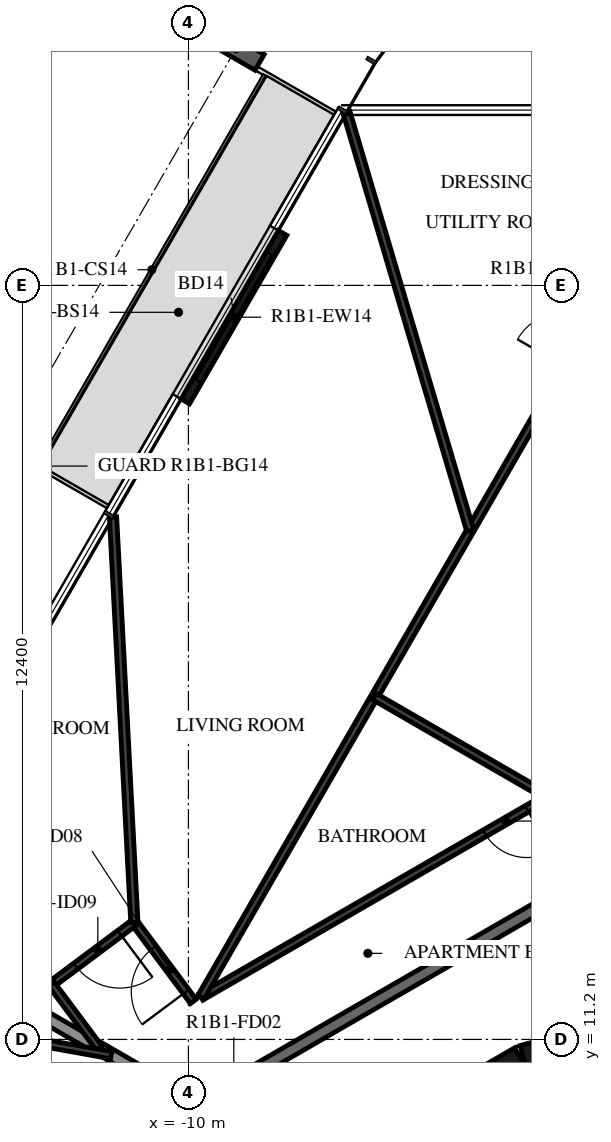
"""IFC4 building model, lengths in metres.
Left out: names, types, materials, properties, quantities, classifications, styles, units other than length and angle.
Written with IfcOpenShell. Run it as: python <this file> out.ifc"""

import sys

from ifc_helpers import new_model, si_unit, direction, frame, frame_2d, origin, origin_2d, place, context, subcontext, project, spatial, rectangle, i_section, extrude, element, fill, save


model = new_model("IFC4")
c1 = context("Model", 3, precision=1e-05, world=origin(), true_north=direction((0.0, 1.0)))
c2 = subcontext(c1, "Body", "Model", "MODEL_VIEW")
j1 = project(units=[si_unit("LENGTHUNIT", "METRE"), si_unit("PLANEANGLEUNIT", "RADIAN")], contexts=[c1])
p1 = place(None, origin())
s1 = spatial("IfcSite", under=j1, at=p1, CompositionType="ELEMENT")
p2 = place(p1, origin())
s2 = spatial("IfcBuilding", under=s1, at=p2, CompositionType="ELEMENT")
p3 = place(p2, frame((0.0, 0.0, 48.9)))
s3 = spatial("IfcBuildingStorey", under=s2, at=p3, CompositionType="ELEMENT", Elevation=48.9)
p4 = place(p3, frame((-9.219, 27.493, -0.38), z_axis=(0.0, 0.0, 1.0), x_axis=(0.50000017485, 0.866025302835, 0.0)))
e1 = element("IfcColumn", 1, at=p4, inside=s3, PredefinedType="COLUMN", context=c2, shape_type="SweptSolid", body=[
    extrude(i_section(OverallWidth=0.3, OverallDepth=0.9, WebThickness=0.019, FlangeThickness=0.035, FilletRadius=0.03, at=origin_2d()), origin(), (0.0, 0.0, 1.0), 3.5),
])
p5 = place(p3, frame((-8.451, 24.463, 0.0), z_axis=(0.0, 0.0, 1.0), x_axis=(-0.499971222258, -0.866042017984, 0.0)))
e2 = element("IfcWall", 2, at=p5, inside=s3, PredefinedType="STANDARD", context=c2, shape_type="SweptSolid", body=[
    extrude(rectangle(XDim=3.2, YDim=0.16, at=frame_2d((1.6, 0.0))), origin(), (0.0, 0.0, 1.0), 3.12),
])
p6 = place(p5, frame((0.4, 0.0, 0.0)))
e3 = element("IfcOpeningElement", 3, at=p6, cuts=e2, PredefinedType="OPENING", context=c2, shape_type="SweptSolid", body=[
    extrude(rectangle(XDim=2.4, YDim=2.4, at=frame_2d((1.2, 1.2))), frame((0.0, 0.09, 0.0), z_axis=(0.0, -1.0, 0.0), x_axis=(1.0, 0.0, 0.0)), (0.0, 0.0, 1.0), 0.18),
])
for number, where, z_axis, x_axis in (
    (4, (-1.55, 11.643, 0.0), (0.0, 0.0, 1.0), (-0.966, -0.259, 0.0)),
    (5, (-4.51, 10.845, 0.0), (0.0, 0.0, 1.0), (-0.866, -0.5, 0.0)),
):
    element("IfcWall", number, at=place(p3, frame(where, z_axis=z_axis, x_axis=x_axis)), inside=s3, PredefinedType="SHEAR", context=c2, shape_type="SweptSolid", body=[
        extrude(rectangle(XDim=3.033, YDim=0.5, at=frame_2d((1.516, 0.0))), origin(), (0.0, 0.0, 1.0), 3.12),
    ])
p7 = place(p3, frame((-3.671, 13.7, 0.0), z_axis=(0.0, 0.0, 1.0), x_axis=(-0.866031419417, -0.499989580474, 0.0)))
e6 = element("IfcWall", 6, at=p7, inside=s3, PredefinedType="STANDARD", context=c2, shape_type="SweptSolid", body=[
    extrude(rectangle(XDim=7.147, YDim=0.2, at=frame_2d((3.573, 0.0))), origin(), (0.0, 0.0, 1.0), 3.12),
])
p8 = place(p7, frame((5.947, 0.0, 0.0)))
e7 = element("IfcOpeningElement", 7, at=p8, cuts=e6, PredefinedType="OPENING", context=c2, shape_type="SweptSolid", body=[
    extrude(rectangle(XDim=1.0, YDim=2.1, at=frame_2d((0.5, 1.05))), frame((0.0, 0.11, 0.0), z_axis=(0.0, -1.0, 0.0), x_axis=(1.0, 0.0, 0.0)), (0.0, 0.0, 1.0), 0.22),
])
p9 = place(p3, frame((-15.08, 13.14, 0.0), z_axis=(0.0, 0.0, 1.0), x_axis=(0.86603112331, -0.49999009336, 0.0)))
e8 = element("IfcWall", 8, at=p9, inside=s3, PredefinedType="STANDARD", context=c2, shape_type="SweptSolid", body=[
    extrude(rectangle(XDim=6.027, YDim=0.2, at=frame_2d((3.014, 0.0))), origin(), (0.0, 0.0, 1.0), 2.73),
])
p10 = place(p3, frame((-9.92, 11.824, 0.0), z_axis=(0.0, 0.0, 1.0), x_axis=(-0.597853402964, 0.801605456921, 0.0)))
e9 = element("IfcWall", 9, at=p10, inside=s3, PredefinedType="PARTITIONING", context=c2, shape_type="SweptSolid", body=[
    extrude(rectangle(XDim=1.621, YDim=0.12, at=frame_2d((0.811, 0.0))), origin(), (0.0, 0.0, 1.0), 3.12),
])
p11 = place(p10, frame((0.2, 0.0, 0.0)))
e10 = element("IfcOpeningElement", 10, at=p11, cuts=e9, PredefinedType="OPENING", context=c2, shape_type="SweptSolid", body=[
    extrude(rectangle(XDim=0.9, YDim=2.1, at=frame_2d((0.45, 1.05))), frame((0.0, 0.07, 0.0), z_axis=(0.0, -1.0, 0.0), x_axis=(1.0, 0.0, 0.0)), (0.0, 0.0, 1.0), 0.14),
])
p12 = place(p3, frame((-4.088, 15.191, 0.0), z_axis=(0.0, 0.0, 1.0), x_axis=(-0.866024500911, -0.50000156382, 0.0)))
e11 = element("IfcWall", 11, at=p12, inside=s3, PredefinedType="PARTITIONING", context=c2, shape_type="SweptSolid", body=[
    extrude(rectangle(XDim=6.587, YDim=0.12, at=frame_2d((3.294, 0.0))), origin(), (0.0, 0.0, 1.0), 3.12),
])
p13 = place(p12, frame((0.4, 0.0, 0.0)))
e12 = element("IfcOpeningElement", 12, at=p13, cuts=e11, PredefinedType="OPENING", context=c2, shape_type="SweptSolid", body=[
    extrude(rectangle(XDim=0.8, YDim=2.1, at=frame_2d((0.4, 1.05))), frame((0.0, 0.07, 0.0), z_axis=(0.0, -1.0, 0.0), x_axis=(1.0, 0.0, 0.0)), (0.0, 0.0, 1.0), 0.14),
])
p14 = place(p3, frame((-10.889, 13.124, 0.0), z_axis=(0.0, 0.0, 1.0), x_axis=(-0.801616976804, -0.597837956724, 0.0)))
e13 = element("IfcWall", 13, at=p14, inside=s3, PredefinedType="PARTITIONING", context=c2, shape_type="SweptSolid", body=[
    extrude(rectangle(XDim=1.7, YDim=0.12, at=frame_2d((0.85, 0.0))), origin(), (0.0, 0.0, 1.0), 3.12),
])
p15 = place(p14, frame((0.3, 0.0, 0.0)))
e14 = element("IfcOpeningElement", 14, at=p15, cuts=e13, PredefinedType="OPENING", context=c2, shape_type="SweptSolid", body=[
    extrude(rectangle(XDim=0.9, YDim=2.1, at=frame_2d((0.45, 1.05))), frame((0.0, 0.07, 0.0), z_axis=(0.0, -1.0, 0.0), x_axis=(1.0, 0.0, 0.0)), (0.0, 0.0, 1.0), 0.14),
])
p16 = place(p3, frame((-12.252, 12.107, 0.0), z_axis=(0.0, 0.0, 1.0), x_axis=(0.597827926538, -0.801624457119, 0.0)))
e15 = element("IfcWall", 15, at=p16, inside=s3, PredefinedType="PARTITIONING", context=c2, shape_type="SweptSolid", body=[
    extrude(rectangle(XDim=1.314, YDim=0.12, at=frame_2d((0.657, 0.0))), origin(), (0.0, 0.0, 1.0), 3.12),
])
p17 = place(p3, frame((-9.793, 11.897, 0.0), z_axis=(0.0, 0.0, 1.0), x_axis=(0.499981117606, 0.866036305265, 0.0)))
e16 = element("IfcWall", 16, at=p17, inside=s3, PredefinedType="PARTITIONING", context=c2, shape_type="SweptSolid", body=[
    extrude(rectangle(XDim=14.434, YDim=0.12, at=frame_2d((7.217, 0.0))), origin(), (0.0, 0.0, 1.0), 3.12),
])
p18 = place(p17, frame((11.97, 0.0, 0.0)))
e17 = element("IfcOpeningElement", 17, at=p18, cuts=e16, PredefinedType="OPENING", context=c2, shape_type="SweptSolid", body=[
    extrude(rectangle(XDim=0.9, YDim=2.1, at=frame_2d((0.45, 1.05))), frame((0.0, 0.07, 0.0), z_axis=(0.0, -1.0, 0.0), x_axis=(1.0, 0.0, 0.0)), (0.0, 0.0, 1.0), 0.14),
])
p19 = place(p3, frame((-6.941, 16.838, 0.0), z_axis=(0.0, 0.0, 1.0), x_axis=(0.866017718408, -0.500013311227, 0.0)))
e18 = element("IfcWall", 18, at=p19, inside=s3, PredefinedType="PARTITIONING", context=c2, shape_type="SweptSolid", body=[
    extrude(rectangle(XDim=3.294, YDim=0.12, at=frame_2d((1.647, 0.0))), origin(), (0.0, 0.0, 1.0), 3.12),
])
p20 = place(p3, frame((-7.4, 26.443, 0.0), z_axis=(0.0, 0.0, 1.0), x_axis=(0.283756762476, -0.958896292489, 0.0)))
e19 = element("IfcWall", 19, at=p20, inside=s3, PredefinedType="PARTITIONING", context=c2, shape_type="SweptSolid", body=[
    extrude(rectangle(XDim=7.17, YDim=0.12, at=frame_2d((3.585, 0.0))), origin(), (0.0, 0.0, 1.0), 3.12),
])
p21 = place(p3, frame((-11.24, 19.792, 0.0), z_axis=(0.0, 0.0, 1.0), x_axis=(0.052579943632, -0.998616718029, 0.0)))
e20 = element("IfcWall", 20, at=p21, inside=s3, PredefinedType="PARTITIONING", context=c2, shape_type="SweptSolid", body=[
    extrude(rectangle(XDim=6.677, YDim=0.12, at=frame_2d((3.338, 0.0))), origin(), (0.0, 0.0, 1.0), 3.12),
])
p22 = place(p3, frame((-11.27, 10.94, 0.0), z_axis=(0.0, 0.0, 1.0), x_axis=(-0.984382718707, 0.176041651637, 0.0)))
e21 = element("IfcWall", 21, at=p22, inside=s3, PredefinedType="PARTITIONING", context=c2, shape_type="SweptSolid", body=[
    extrude(rectangle(XDim=2.222, YDim=0.12, at=frame_2d((1.111, 0.0))), origin(), (0.0, 0.0, 1.0), 3.12),
])
p23 = place(p6, origin())
e22 = element("IfcDoor", 22, at=p23, inside=s3, OperationType="DOUBLE_DOOR_SLIDING", PredefinedType="DOOR", context=c2, shape_type="SweptSolid", body=[
    extrude(rectangle(XDim=2.4, YDim=2.4, at=frame_2d((1.2, 1.2))), frame((0.0, 0.025, 0.0), z_axis=(0.0, -1.0, 0.0), x_axis=(1.0, 0.0, 0.0)), (0.0, 0.0, 1.0), 0.05),
])
fill(e3, e22)
p24 = place(p11, origin())
e23 = element("IfcDoor", 23, at=p24, inside=s3, OperationType="SINGLE_SWING_RIGHT", PredefinedType="DOOR", context=c2, shape_type="SweptSolid", body=[
    extrude(rectangle(XDim=0.9, YDim=2.1, at=frame_2d((0.45, 1.05))), frame((0.0, 0.025, 0.0), z_axis=(0.0, -1.0, 0.0), x_axis=(1.0, 0.0, 0.0)), (0.0, 0.0, 1.0), 0.05),
])
fill(e10, e23)
p25 = place(p13, origin())
e24 = element("IfcDoor", 24, at=p25, inside=s3, OperationType="SINGLE_SWING_LEFT", PredefinedType="DOOR", context=c2, shape_type="SweptSolid", body=[
    extrude(rectangle(XDim=0.8, YDim=2.1, at=frame_2d((0.4, 1.05))), frame((0.0, 0.025, 0.0), z_axis=(0.0, -1.0, 0.0), x_axis=(1.0, 0.0, 0.0)), (0.0, 0.0, 1.0), 0.05),
])
fill(e12, e24)
p26 = place(p15, origin())
e25 = element("IfcDoor", 25, at=p26, inside=s3, OperationType="SINGLE_SWING_LEFT", PredefinedType="DOOR", context=c2, shape_type="SweptSolid", body=[
    extrude(rectangle(XDim=0.9, YDim=2.1, at=frame_2d((0.45, 1.05))), frame((0.0, 0.025, 0.0), z_axis=(0.0, -1.0, 0.0), x_axis=(1.0, 0.0, 0.0)), (0.0, 0.0, 1.0), 0.05),
])
fill(e14, e25)
save(model, sys.argv[1])
